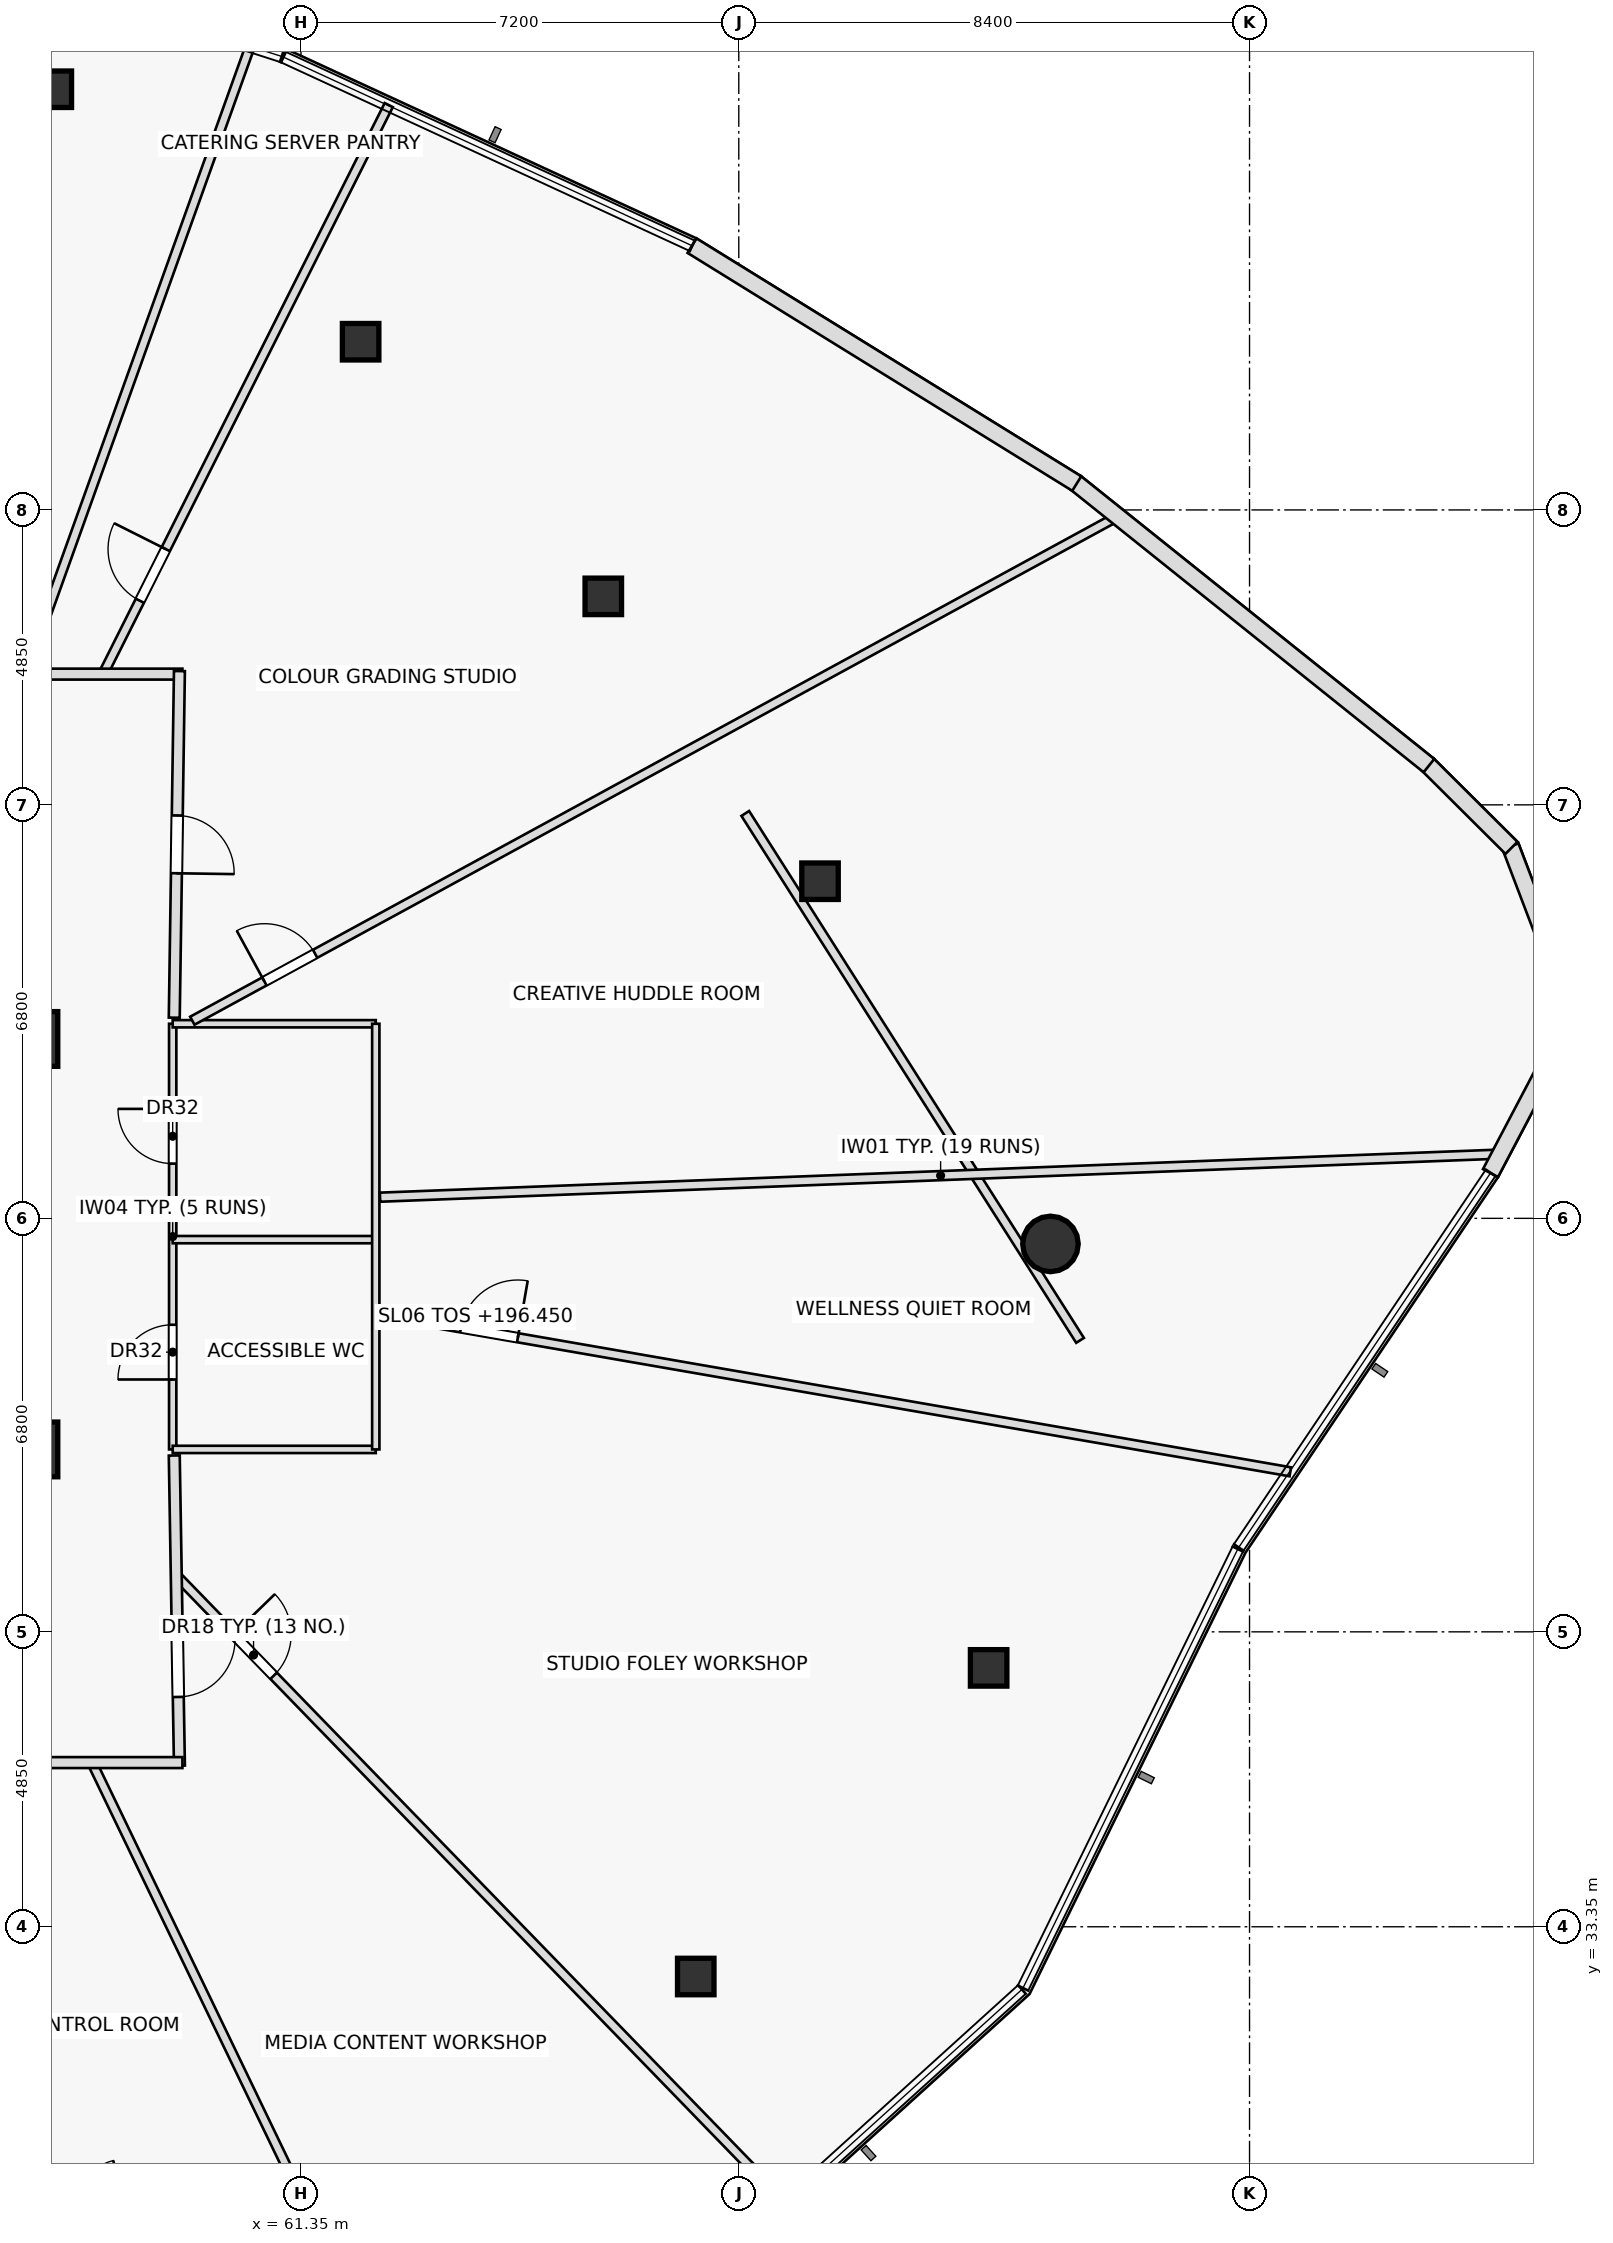
"""IFC4 building model, lengths in metres.
Left out: names, types, materials, properties, quantities, classifications, styles, units other than length and angle.
Written with IfcOpenShell. Run it as: python <this file> out.ifc"""

import sys

from ifc_helpers import new_model, si_unit, direction, frame, frame_2d, origin, origin_2d, place, context, subcontext, project, spatial, rectangle, hollow_rectangle, hollow_circle, extrude, element, fill, save


model = new_model("IFC4")
c1 = context("Model", 3, precision=1e-05, world=origin(), true_north=direction((0.0, 1.0)))
c2 = subcontext(c1, "Body", "Model", "MODEL_VIEW")
j1 = project(units=[si_unit("LENGTHUNIT", "METRE"), si_unit("PLANEANGLEUNIT", "RADIAN")], contexts=[c1])
p1 = place(None, origin())
s1 = spatial("IfcSite", under=j1, at=p1, CompositionType="ELEMENT")
p2 = place(p1, origin())
s2 = spatial("IfcBuilding", under=s1, at=p2, CompositionType="ELEMENT")
p3 = place(p2, frame((0.0, 0.0, 196.45)))
s3 = spatial("IfcBuildingStorey", under=s2, at=p3, CompositionType="ELEMENT", Elevation=196.45)
for number, where, z_axis, x_axis in (
    (1, (56.9, 47.95, 0.0), (0.0, 0.0, 1.0), (1.0, 0.0, 0.0)),
    (2, (56.9, 41.2, 0.0), (0.0, 0.0, 1.0), (1.0, 0.0, 0.0)),
):
    element("IfcColumn", number, at=place(p3, frame(where, z_axis=z_axis, x_axis=x_axis)), inside=s3, PredefinedType="COLUMN", context=c2, shape_type="SweptSolid", body=[
        extrude(rectangle(XDim=0.9, YDim=0.9, at=origin_2d()), origin(), (0.0, 0.0, 1.0), 3.55),
    ])
for number, where, z_axis, x_axis in (
    (3, (67.842, 32.532, 0.0), (0.0, 0.0, 1.0), (1.0, 0.0, 0.0)),
    (4, (72.659, 37.607, 0.0), (0.0, 0.0, 1.0), (1.0, 0.0, 0.0)),
):
    element("IfcColumn", number, at=place(p3, frame(where, z_axis=z_axis, x_axis=x_axis)), inside=s3, PredefinedType="COLUMN", context=c2, shape_type="SweptSolid", body=[
        extrude(hollow_rectangle(XDim=0.6, YDim=0.6, WallThickness=0.036, at=origin_2d()), origin(), (0.0, 0.0, 1.0), 3.55),
    ])
p4 = place(p3, frame((73.676, 44.58, 0.0), z_axis=(0.0, 0.0, 1.0), x_axis=(1.0, 0.0, 0.0)))
e5 = element("IfcColumn", 5, at=p4, inside=s3, PredefinedType="COLUMN", context=c2, shape_type="SweptSolid", body=[
    extrude(hollow_circle(Radius=0.457, WallThickness=0.04, at=origin_2d()), origin(), (0.0, 0.0, 1.0), 3.55),
])
for number, where, z_axis, x_axis in (
    (6, (69.886, 50.544, 0.0), (0.0, 0.0, 1.0), (1.0, 0.0, 0.0)),
    (7, (66.322, 55.229, 0.0), (0.0, 0.0, 1.0), (1.0, 0.0, 0.0)),
    (8, (62.331, 59.416, 0.0), (0.0, 0.0, 1.0), (1.0, 0.0, 0.0)),
    (9, (57.277, 63.568, 0.0), (0.0, 0.0, 1.0), (1.0, 0.0, 0.0)),
):
    element("IfcColumn", number, at=place(p3, frame(where, z_axis=z_axis, x_axis=x_axis)), inside=s3, PredefinedType="COLUMN", context=c2, shape_type="SweptSolid", body=[
        extrude(hollow_rectangle(XDim=0.6, YDim=0.6, WallThickness=0.036, at=origin_2d()), origin(), (0.0, 0.0, 1.0), 3.55),
    ])
p5 = place(p3, frame((74.163, 42.993, 0.0), z_axis=(0.0, 0.0, 1.0), x_axis=(-0.53628142437, 0.844039237166, 0.0)))
e10 = element("IfcWall", 10, at=p5, inside=s3, PredefinedType="PARTITIONING", context=c2, shape_type="SweptSolid", body=[
    extrude(rectangle(XDim=10.267, YDim=0.15, at=frame_2d((5.133, 0.0))), origin(), (0.0, 0.0, 1.0), 2.935),
])
p6 = place(p3, frame((59.24, 41.2, 0.0), z_axis=(0.0, 0.0, 1.0), x_axis=(0.0, 1.0, 0.0)))
e11 = element("IfcWall", 11, at=p6, inside=s3, PredefinedType="PARTITIONING", context=c2, shape_type="SweptSolid", body=[
    extrude(rectangle(XDim=7.0, YDim=0.12, at=frame_2d((3.5, 0.0))), origin(), (0.0, 0.0, 1.0), 3.55),
])
p7 = place(p6, frame((1.15, 0.0, 0.0)))
e12 = element("IfcOpeningElement", 12, at=p7, cuts=e11, PredefinedType="OPENING", context=c2, shape_type="SweptSolid", body=[
    extrude(rectangle(XDim=0.9, YDim=2.05, at=frame_2d((0.45, 1.025))), frame((0.0, 0.07, 0.0), z_axis=(0.0, -1.0, 0.0), x_axis=(1.0, 0.0, 0.0)), (0.0, 0.0, 1.0), 0.14),
])
p8 = place(p6, frame((4.7, 0.0, 0.0)))
e13 = element("IfcOpeningElement", 13, at=p8, cuts=e11, PredefinedType="OPENING", context=c2, shape_type="SweptSolid", body=[
    extrude(rectangle(XDim=0.9, YDim=2.05, at=frame_2d((0.45, 1.025))), frame((0.0, 0.07, 0.0), z_axis=(0.0, -1.0, 0.0), x_axis=(1.0, 0.0, 0.0)), (0.0, 0.0, 1.0), 0.14),
])
for number, where, z_axis, x_axis in (
    (14, (59.24, 41.2, 0.0), (0.0, 0.0, 1.0), (1.0, 0.0, 0.0)),
    (15, (59.24, 44.65, 0.0), (0.0, 0.0, 1.0), (1.0, 0.0, 0.0)),
    (16, (59.24, 48.2, 0.0), (0.0, 0.0, 1.0), (1.0, 0.0, 0.0)),
):
    element("IfcWall", number, at=place(p3, frame(where, z_axis=z_axis, x_axis=x_axis)), inside=s3, PredefinedType="PARTITIONING", context=c2, shape_type="SweptSolid", body=[
        extrude(rectangle(XDim=3.34, YDim=0.12, at=frame_2d((1.67, 0.0))), origin(), (0.0, 0.0, 1.0), 3.55),
    ])
p9 = place(p3, frame((62.58, 41.2, 0.0), z_axis=(0.0, 0.0, 1.0), x_axis=(0.0, 1.0, 0.0)))
e17 = element("IfcWall", 17, at=p9, inside=s3, PredefinedType="PARTITIONING", context=c2, shape_type="SweptSolid", body=[
    extrude(rectangle(XDim=7.0, YDim=0.12, at=frame_2d((3.5, 0.0))), origin(), (0.0, 0.0, 1.0), 3.55),
])
p10 = place(p3, frame((57.912, 36.05, 0.0), z_axis=(0.0, 0.0, 1.0), x_axis=(0.434030412816, -0.900898218863, 0.0)))
e18 = element("IfcWall", 18, at=p10, inside=s3, PredefinedType="PARTITIONING", context=c2, shape_type="SweptSolid", body=[
    extrude(rectangle(XDim=12.951, YDim=0.15, at=frame_2d((6.476, 0.0))), origin(), (0.0, 0.0, 1.0), 3.025),
])
p11 = place(p3, frame((59.299, 39.128, 0.0), z_axis=(0.0, 0.0, 1.0), x_axis=(0.696450218234, -0.717605109738, 0.0)))
e19 = element("IfcWall", 19, at=p11, inside=s3, PredefinedType="PARTITIONING", context=c2, shape_type="SweptSolid", body=[
    extrude(rectangle(XDim=14.403, YDim=0.15, at=frame_2d((7.201, 0.0))), origin(), (0.0, 0.0, 1.0), 2.935),
])
p12 = place(p11, frame((1.35, 0.0, 0.0)))
e20 = element("IfcOpeningElement", 20, at=p12, cuts=e19, PredefinedType="OPENING", context=c2, shape_type="SweptSolid", body=[
    extrude(rectangle(XDim=0.95, YDim=2.05, at=frame_2d((0.475, 1.025))), frame((0.0, 0.085, 0.0), z_axis=(0.0, -1.0, 0.0), x_axis=(1.0, 0.0, 0.0)), (0.0, 0.0, 1.0), 0.17),
])
p13 = place(p3, frame((62.65, 43.43, 0.0), z_axis=(0.0, 0.0, 1.0), x_axis=(0.985278191403, -0.170958724687, 0.0)))
e21 = element("IfcWall", 21, at=p13, inside=s3, PredefinedType="PARTITIONING", context=c2, shape_type="SweptSolid", body=[
    extrude(rectangle(XDim=15.195, YDim=0.15, at=frame_2d((7.597, 0.0))), origin(), (0.0, 0.0, 1.0), 2.935),
])
p14 = place(p13, frame((1.35, 0.0, 0.0)))
e22 = element("IfcOpeningElement", 22, at=p14, cuts=e21, PredefinedType="OPENING", context=c2, shape_type="SweptSolid", body=[
    extrude(rectangle(XDim=0.95, YDim=2.05, at=frame_2d((0.475, 1.025))), frame((0.0, 0.085, 0.0), z_axis=(0.0, -1.0, 0.0), x_axis=(1.0, 0.0, 0.0)), (0.0, 0.0, 1.0), 0.17),
])
p15 = place(p3, frame((62.65, 45.348, 0.0), z_axis=(0.0, 0.0, 1.0), x_axis=(0.999261116002, 0.038434646444, 0.0)))
e23 = element("IfcWall", 23, at=p15, inside=s3, PredefinedType="PARTITIONING", context=c2, shape_type="SweptSolid", body=[
    extrude(rectangle(XDim=18.453, YDim=0.15, at=frame_2d((9.227, 0.0))), origin(), (0.0, 0.0, 1.0), 3.025),
])
p16 = place(p3, frame((59.563, 48.25, 0.0), z_axis=(0.0, 0.0, 1.0), x_axis=(0.878046175679, 0.478575922269, 0.0)))
e24 = element("IfcWall", 24, at=p16, inside=s3, PredefinedType="PARTITIONING", context=c2, shape_type="SweptSolid", body=[
    extrude(rectangle(XDim=17.342, YDim=0.15, at=frame_2d((8.671, 0.0))), origin(), (0.0, 0.0, 1.0), 2.935),
])
p17 = place(p16, frame((1.35, 0.0, 0.0)))
e25 = element("IfcOpeningElement", 25, at=p17, cuts=e24, PredefinedType="OPENING", context=c2, shape_type="SweptSolid", body=[
    extrude(rectangle(XDim=0.95, YDim=2.05, at=frame_2d((0.475, 1.025))), frame((0.0, 0.085, 0.0), z_axis=(0.0, -1.0, 0.0), x_axis=(1.0, 0.0, 0.0)), (0.0, 0.0, 1.0), 0.17),
])
p18 = place(p3, frame((58.094, 53.95, 0.0), z_axis=(0.0, 0.0, 1.0), x_axis=(0.448770289667, 0.89364714911, 0.0)))
e26 = element("IfcWall", 26, at=p18, inside=s3, PredefinedType="PARTITIONING", context=c2, shape_type="SweptSolid", body=[
    extrude(rectangle(XDim=10.472, YDim=0.15, at=frame_2d((5.236, 0.0))), origin(), (0.0, 0.0, 1.0), 3.025),
])
p19 = place(p18, frame((1.35, 0.0, 0.0)))
e27 = element("IfcOpeningElement", 27, at=p19, cuts=e26, PredefinedType="OPENING", context=c2, shape_type="SweptSolid", body=[
    extrude(rectangle(XDim=0.95, YDim=2.05, at=frame_2d((0.475, 1.025))), frame((0.0, 0.085, 0.0), z_axis=(0.0, -1.0, 0.0), x_axis=(1.0, 0.0, 0.0)), (0.0, 0.0, 1.0), 0.17),
])
p20 = place(p3, frame((56.81, 53.95, 0.0), z_axis=(0.0, 0.0, 1.0), x_axis=(0.337634919484, 0.941277143643, 0.0)))
e28 = element("IfcWall", 28, at=p20, inside=s3, PredefinedType="PARTITIONING", context=c2, shape_type="SweptSolid", body=[
    extrude(rectangle(XDim=10.979, YDim=0.15, at=frame_2d((5.489, 0.0))), origin(), (0.0, 0.0, 1.0), 2.935),
])
p21 = place(p3, frame((54.3, 53.95, 0.0), z_axis=(0.0, 0.0, 1.0), x_axis=(1.0, 0.0, 0.0)))
e29 = element("IfcWall", 29, at=p21, inside=s3, PredefinedType="PARTITIONING", context=c2, shape_type="SweptSolid", body=[
    extrude(rectangle(XDim=5.1, YDim=0.18, at=frame_2d((2.55, 0.0))), origin(), (0.0, 0.0, 1.0), 2.935),
])
p22 = place(p21, frame((0.914, 0.0, 0.0)))
e30 = element("IfcOpeningElement", 30, at=p22, cuts=e29, PredefinedType="OPENING", context=c2, shape_type="SweptSolid", body=[
    extrude(rectangle(XDim=0.95, YDim=2.05, at=frame_2d((0.475, 1.025))), frame((0.0, 0.1, 0.0), z_axis=(0.0, -1.0, 0.0), x_axis=(1.0, 0.0, 0.0)), (0.0, 0.0, 1.0), 0.2),
])
p23 = place(p3, frame((59.351, 54.0, 0.0), z_axis=(0.0, 0.0, 1.0), x_axis=(-0.014903899768, -0.999888930718, 0.0)))
e31 = element("IfcWall", 31, at=p23, inside=s3, PredefinedType="PARTITIONING", context=c2, shape_type="SweptSolid", body=[
    extrude(rectangle(XDim=5.701, YDim=0.18, at=frame_2d((2.85, 0.0))), origin(), (0.0, 0.0, 1.0), 2.935),
])
p24 = place(p23, frame((2.375, 0.0, 0.0)))
e32 = element("IfcOpeningElement", 32, at=p24, cuts=e31, PredefinedType="OPENING", context=c2, shape_type="SweptSolid", body=[
    extrude(rectangle(XDim=0.95, YDim=2.05, at=frame_2d((0.475, 1.025))), frame((0.0, 0.1, 0.0), z_axis=(0.0, -1.0, 0.0), x_axis=(1.0, 0.0, 0.0)), (0.0, 0.0, 1.0), 0.2),
])
p25 = place(p3, frame((59.266, 41.1, 0.0), z_axis=(0.0, 0.0, 1.0), x_axis=(0.016656377357, -0.999861272924, 0.0)))
e33 = element("IfcWall", 33, at=p25, inside=s3, PredefinedType="PARTITIONING", context=c2, shape_type="SweptSolid", body=[
    extrude(rectangle(XDim=5.101, YDim=0.18, at=frame_2d((2.55, 0.0))), origin(), (0.0, 0.0, 1.0), 2.935),
])
p26 = place(p25, frame((3.021, 0.0, 0.0)))
e34 = element("IfcOpeningElement", 34, at=p26, cuts=e33, PredefinedType="OPENING", context=c2, shape_type="SweptSolid", body=[
    extrude(rectangle(XDim=0.95, YDim=2.05, at=frame_2d((0.475, 1.025))), frame((0.0, 0.1, 0.0), z_axis=(0.0, -1.0, 0.0), x_axis=(1.0, 0.0, 0.0)), (0.0, 0.0, 1.0), 0.2),
])
p27 = place(p3, frame((59.4, 36.05, 0.0), z_axis=(0.0, 0.0, 1.0), x_axis=(-1.0, 0.0, 0.0)))
e35 = element("IfcWall", 35, at=p27, inside=s3, PredefinedType="PARTITIONING", context=c2, shape_type="SweptSolid", body=[
    extrude(rectangle(XDim=19.65, YDim=0.18, at=frame_2d((9.825, 0.0))), origin(), (0.0, 0.0, 1.0), 2.935),
])
p28 = place(p27, frame((2.805, 0.0, 0.0)))
e36 = element("IfcOpeningElement", 36, at=p28, cuts=e35, PredefinedType="OPENING", context=c2, shape_type="SweptSolid", body=[
    extrude(rectangle(XDim=0.95, YDim=2.05, at=frame_2d((0.475, 1.025))), frame((0.0, 0.1, 0.0), z_axis=(0.0, -1.0, 0.0), x_axis=(1.0, 0.0, 0.0)), (0.0, 0.0, 1.0), 0.2),
])
p29 = place(p27, frame((11.261, 0.0, 0.0)))
e37 = element("IfcOpeningElement", 37, at=p29, cuts=e35, PredefinedType="OPENING", context=c2, shape_type="SweptSolid", body=[
    extrude(rectangle(XDim=0.95, YDim=2.05, at=frame_2d((0.475, 1.025))), frame((0.0, 0.1, 0.0), z_axis=(0.0, -1.0, 0.0), x_axis=(1.0, 0.0, 0.0)), (0.0, 0.0, 1.0), 0.2),
])
p30 = place(p3, frame((80.913, 45.744, 0.0), z_axis=(0.0, 0.0, 1.0), x_axis=(0.465538430263, 0.885027666205, 0.0)))
e38 = element("IfcWall", 38, at=p30, inside=s3, PredefinedType="STANDARD", context=c2, shape_type="SweptSolid", body=[
    extrude(rectangle(XDim=1.935, YDim=0.28, at=frame_2d((0.968, 0.0))), origin(), (0.0, 0.0, 1.0), 3.55),
])
p31 = place(p3, frame((81.927, 49.32, 0.0), z_axis=(0.0, 0.0, 1.0), x_axis=(-0.355889766288, 0.934527941932, 0.0)))
e39 = element("IfcWall", 39, at=p31, inside=s3, PredefinedType="STANDARD", context=c2, shape_type="SweptSolid", body=[
    extrude(rectangle(XDim=1.924, YDim=0.28, at=frame_2d((0.962, 0.0))), origin(), (0.0, 0.0, 1.0), 3.55),
])
p32 = place(p3, frame((81.258, 51.093, 0.0), z_axis=(0.0, 0.0, 1.0), x_axis=(-0.708861069534, 0.70534812972, 0.0)))
e40 = element("IfcWall", 40, at=p32, inside=s3, PredefinedType="STANDARD", context=c2, shape_type="SweptSolid", body=[
    extrude(rectangle(XDim=1.946, YDim=0.28, at=frame_2d((0.973, 0.0))), origin(), (0.0, 0.0, 1.0), 3.55),
])
p33 = place(p3, frame((79.901, 52.445, 0.0), z_axis=(0.0, 0.0, 1.0), x_axis=(-0.780676965022, 0.624934777624, 0.0)))
e41 = element("IfcWall", 41, at=p33, inside=s3, PredefinedType="STANDARD", context=c2, shape_type="SweptSolid", body=[
    extrude(rectangle(XDim=7.451, YDim=0.28, at=frame_2d((3.725, 0.0))), origin(), (0.0, 0.0, 1.0), 3.55),
])
p34 = place(p3, frame((74.108, 57.084, 0.0), z_axis=(0.0, 0.0, 1.0), x_axis=(-0.850576953838, 0.525850592468, 0.0)))
e42 = element("IfcWall", 42, at=p34, inside=s3, PredefinedType="STANDARD", context=c2, shape_type="SweptSolid", body=[
    extrude(rectangle(XDim=7.439, YDim=0.28, at=frame_2d((3.719, 0.0))), origin(), (0.0, 0.0, 1.0), 3.55),
])
p35 = place(p7, origin())
e43 = element("IfcDoor", 43, at=p35, inside=s3, OperationType="SINGLE_SWING_LEFT", PredefinedType="DOOR", context=c2, shape_type="SweptSolid", body=[
    extrude(rectangle(XDim=0.9, YDim=2.05, at=frame_2d((0.45, 1.025))), frame((0.0, 0.025, 0.0), z_axis=(0.0, -1.0, 0.0), x_axis=(1.0, 0.0, 0.0)), (0.0, 0.0, 1.0), 0.05),
])
fill(e12, e43)
p36 = place(p8, origin())
e44 = element("IfcDoor", 44, at=p36, inside=s3, OperationType="SINGLE_SWING_RIGHT", PredefinedType="DOOR", context=c2, shape_type="SweptSolid", body=[
    extrude(rectangle(XDim=0.9, YDim=2.05, at=frame_2d((0.45, 1.025))), frame((0.0, 0.025, 0.0), z_axis=(0.0, -1.0, 0.0), x_axis=(1.0, 0.0, 0.0)), (0.0, 0.0, 1.0), 0.05),
])
fill(e13, e44)
p37 = place(p12, origin())
e45 = element("IfcDoor", 45, at=p37, inside=s3, OperationType="SINGLE_SWING_LEFT", PredefinedType="DOOR", context=c2, shape_type="SweptSolid", body=[
    extrude(rectangle(XDim=0.95, YDim=2.05, at=frame_2d((0.475, 1.025))), frame((0.0, 0.025, 0.0), z_axis=(0.0, -1.0, 0.0), x_axis=(1.0, 0.0, 0.0)), (0.0, 0.0, 1.0), 0.05),
])
fill(e20, e45)
p38 = place(p14, origin())
e46 = element("IfcDoor", 46, at=p38, inside=s3, OperationType="SINGLE_SWING_RIGHT", PredefinedType="DOOR", context=c2, shape_type="SweptSolid", body=[
    extrude(rectangle(XDim=0.95, YDim=2.05, at=frame_2d((0.475, 1.025))), frame((0.0, 0.025, 0.0), z_axis=(0.0, -1.0, 0.0), x_axis=(1.0, 0.0, 0.0)), (0.0, 0.0, 1.0), 0.05),
])
fill(e22, e46)
p39 = place(p17, origin())
e47 = element("IfcDoor", 47, at=p39, inside=s3, OperationType="SINGLE_SWING_LEFT", PredefinedType="DOOR", context=c2, shape_type="SweptSolid", body=[
    extrude(rectangle(XDim=0.95, YDim=2.05, at=frame_2d((0.475, 1.025))), frame((0.0, 0.025, 0.0), z_axis=(0.0, -1.0, 0.0), x_axis=(1.0, 0.0, 0.0)), (0.0, 0.0, 1.0), 0.05),
])
fill(e25, e47)
p40 = place(p19, origin())
e48 = element("IfcDoor", 48, at=p40, inside=s3, OperationType="SINGLE_SWING_RIGHT", PredefinedType="DOOR", context=c2, shape_type="SweptSolid", body=[
    extrude(rectangle(XDim=0.95, YDim=2.05, at=frame_2d((0.475, 1.025))), frame((0.0, 0.025, 0.0), z_axis=(0.0, -1.0, 0.0), x_axis=(1.0, 0.0, 0.0)), (0.0, 0.0, 1.0), 0.05),
])
fill(e27, e48)
p41 = place(p24, origin())
e49 = element("IfcDoor", 49, at=p41, inside=s3, OperationType="SINGLE_SWING_RIGHT", PredefinedType="DOOR", context=c2, shape_type="SweptSolid", body=[
    extrude(rectangle(XDim=0.95, YDim=2.05, at=frame_2d((0.475, 1.025))), frame((0.0, 0.025, 0.0), z_axis=(0.0, -1.0, 0.0), x_axis=(1.0, 0.0, 0.0)), (0.0, 0.0, 1.0), 0.05),
])
fill(e32, e49)
p42 = place(p26, origin())
e50 = element("IfcDoor", 50, at=p42, inside=s3, OperationType="SINGLE_SWING_LEFT", PredefinedType="DOOR", context=c2, shape_type="SweptSolid", body=[
    extrude(rectangle(XDim=0.95, YDim=2.05, at=frame_2d((0.475, 1.025))), frame((0.0, 0.025, 0.0), z_axis=(0.0, -1.0, 0.0), x_axis=(1.0, 0.0, 0.0)), (0.0, 0.0, 1.0), 0.05),
])
fill(e34, e50)
save(model, sys.argv[1])
